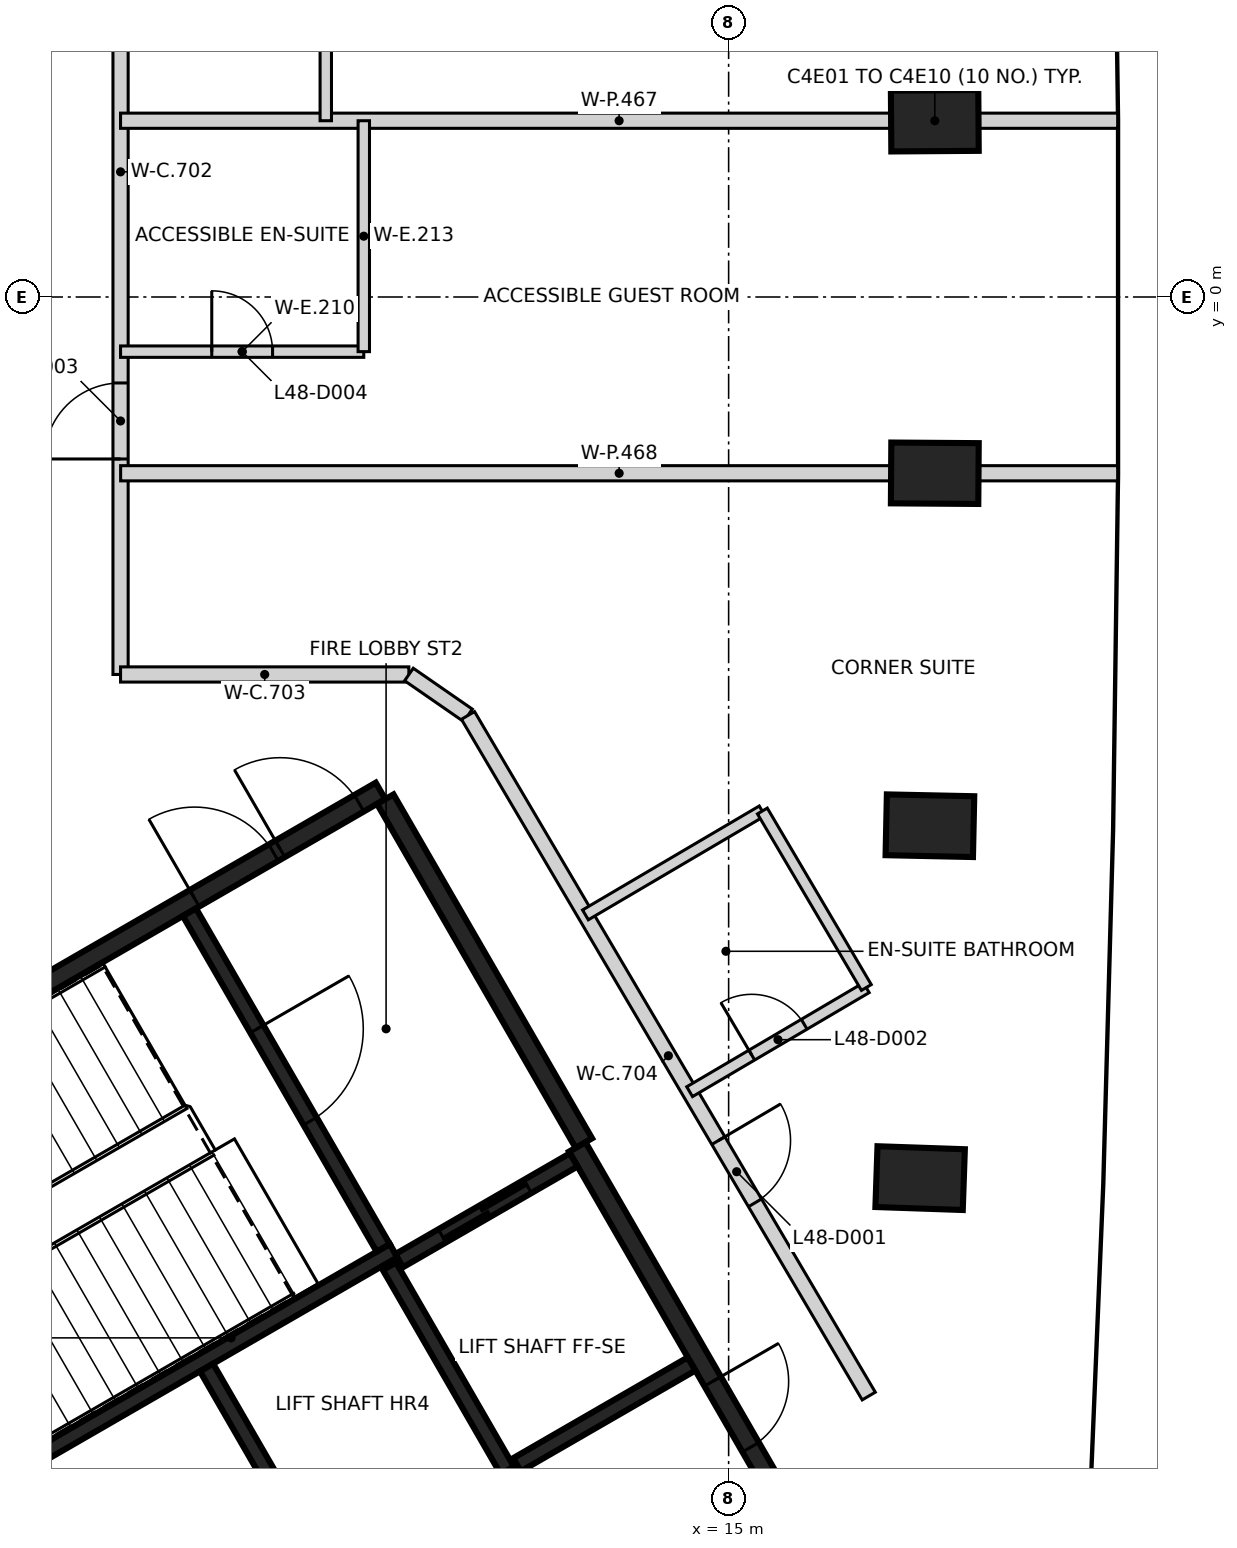
"""IFC4 building model, lengths in metres.
Left out: names, types, materials, properties, quantities, classifications, styles, units other than length and angle.
Written with IfcOpenShell. Run it as: python <this file> out.ifc"""

import sys

from ifc_helpers import new_model, si_unit, direction, frame, frame_2d, origin, origin_2d, place, context, subcontext, project, spatial, rectangle, extrude, element, fill, save


model = new_model("IFC4")
c1 = context("Model", 3, precision=1e-05, world=origin(), true_north=direction((0.0, 1.0)))
c2 = subcontext(c1, "Body", "Model", "MODEL_VIEW")
j1 = project(units=[si_unit("LENGTHUNIT", "METRE"), si_unit("PLANEANGLEUNIT", "RADIAN")], contexts=[c1])
p1 = place(None, origin())
s1 = spatial("IfcSite", under=j1, at=p1, CompositionType="ELEMENT")
p2 = place(p1, origin())
s2 = spatial("IfcBuilding", under=s1, at=p2, CompositionType="ELEMENT")
p3 = place(p2, frame((0.0, 0.0, 193.6)))
s3 = spatial("IfcBuildingStorey", under=s2, at=p3, CompositionType="ELEMENT", Elevation=193.6)
for number, where, z_axis, x_axis in (
    (1, (17.519, -11.592, -0.35), (0.0, 0.0, 1.0), (-0.999, 0.034, 0.0)),
    (2, (17.648, -6.956, -0.35), (0.0, 0.0, 1.0), (-1.0, 0.021, 0.0)),
    (3, (17.712, -2.319, -0.35), (0.0, 0.0, 1.0), (-1.0, 0.007, 0.0)),
    (4, (17.712, 2.319, -0.35), (0.0, 0.0, 1.0), (1.0, 0.007, 0.0)),
):
    element("IfcColumn", number, at=place(p3, frame(where, z_axis=z_axis, x_axis=x_axis)), inside=s3, PredefinedType="COLUMN", context=c2, shape_type="SweptSolid", body=[
        extrude(rectangle(XDim=1.15, YDim=0.8, at=origin_2d()), origin(), (0.0, 0.0, 1.0), 3.6),
    ])
p4 = place(p3, frame((0.417, -12.273, 0.0), z_axis=(0.0, 0.0, 1.0), x_axis=(0.866021906294, 0.500006057782, 0.0)))
e5 = element("IfcWall", 5, at=p4, inside=s3, PredefinedType="SHEAR", context=c2, shape_type="SweptSolid", body=[
    extrude(rectangle(XDim=11.55, YDim=0.25, at=frame_2d((5.775, 0.0))), origin(), (0.0, 0.0, 1.0), 3.25),
])
p5 = place(p4, frame((10.025, 0.0, 0.0)))
e6 = element("IfcOpeningElement", 6, at=p5, cuts=e5, PredefinedType="OPENING", context=c2, shape_type="SweptSolid", body=[
    extrude(rectangle(XDim=1.2, YDim=2.1, at=frame_2d((0.6, 1.05))), frame((0.0, 0.135, 0.0), z_axis=(0.0, -1.0, 0.0), x_axis=(1.0, 0.0, 0.0)), (0.0, 0.0, 1.0), 0.27),
])
p6 = place(p4, frame((8.725, 0.0, 0.0)))
e7 = element("IfcOpeningElement", 7, at=p6, cuts=e5, PredefinedType="OPENING", context=c2, shape_type="SweptSolid", body=[
    extrude(rectangle(XDim=1.2, YDim=2.1, at=frame_2d((0.6, 1.05))), frame((0.0, 0.135, 0.0), z_axis=(0.0, -1.0, 0.0), x_axis=(1.0, 0.0, 0.0)), (0.0, 0.0, 1.0), 0.27),
])
p7 = place(p3, frame((13.008, -11.181, 0.0), z_axis=(0.0, 0.0, 1.0), x_axis=(0.500001955336, -0.866024274868, 0.0)))
e8 = element("IfcWall", 8, at=p7, inside=s3, PredefinedType="SHEAR", context=c2, shape_type="SweptSolid", body=[
    extrude(rectangle(XDim=6.125, YDim=0.25, at=frame_2d((3.062, 0.0))), origin(), (0.0, 0.0, 1.0), 3.25),
])
p8 = place(p7, frame((3.563, 0.0, 0.0)))
e9 = element("IfcOpeningElement", 9, at=p8, cuts=e8, PredefinedType="OPENING", context=c2, shape_type="SweptSolid", body=[
    extrude(rectangle(XDim=1.0, YDim=2.1, at=frame_2d((0.5, 1.05))), frame((0.0, 0.135, 0.0), z_axis=(0.0, -1.0, 0.0), x_axis=(1.0, 0.0, 0.0)), (0.0, 0.0, 1.0), 0.27),
])
p9 = place(p3, frame((10.483, -6.606, 0.0), z_axis=(0.0, 0.0, 1.0), x_axis=(0.49999885962, -0.866026062182, 0.0)))
e10 = element("IfcWall", 10, at=p9, inside=s3, PredefinedType="SHEAR", context=c2, shape_type="SweptSolid", body=[
    extrude(rectangle(XDim=5.225, YDim=0.25, at=frame_2d((2.612, 0.0))), origin(), (0.0, 0.0, 1.0), 3.25),
])
p10 = place(p3, frame((5.419, -15.534, 0.0), z_axis=(0.0, 0.0, 1.0), x_axis=(0.866029065029, 0.499993658486, 0.0)))
e11 = element("IfcWall", 11, at=p10, inside=s3, PredefinedType="SHEAR", context=c2, shape_type="SweptSolid", body=[
    extrude(rectangle(XDim=5.974, YDim=0.2, at=frame_2d((2.987, 0.0))), origin(), (0.0, 0.0, 1.0), 3.25),
])
p11 = place(p3, frame((7.01, -18.542, 0.0), z_axis=(0.0, 0.0, 1.0), x_axis=(0.866030299012, 0.499991521122, 0.0)))
e12 = element("IfcWall", 12, at=p11, inside=s3, PredefinedType="SHEAR", context=c2, shape_type="SweptSolid", body=[
    extrude(rectangle(XDim=6.1, YDim=0.2, at=frame_2d((3.05, 0.0))), origin(), (0.0, 0.0, 1.0), 3.25),
])
p12 = place(p11, frame((1.0, 0.0, 0.0)))
e13 = element("IfcOpeningElement", 13, at=p12, cuts=e12, PredefinedType="OPENING", context=c2, shape_type="SweptSolid", body=[
    extrude(rectangle(XDim=1.2, YDim=2.1, at=frame_2d((0.6, 1.05))), frame((0.0, 0.11, 0.0), z_axis=(0.0, -1.0, 0.0), x_axis=(1.0, 0.0, 0.0)), (0.0, 0.0, 1.0), 0.22),
])
p13 = place(p11, frame((3.982, 0.0, 0.0)))
e14 = element("IfcOpeningElement", 14, at=p13, cuts=e12, PredefinedType="OPENING", context=c2, shape_type="SweptSolid", body=[
    extrude(rectangle(XDim=1.2, YDim=2.1, at=frame_2d((0.6, 1.05))), frame((0.0, 0.11, 0.0), z_axis=(0.0, -1.0, 0.0), x_axis=(1.0, 0.0, 0.0)), (0.0, 0.0, 1.0), 0.22),
])
p14 = place(p3, frame((7.906, -8.094, 0.0), z_axis=(0.0, 0.0, 1.0), x_axis=(0.500027839223, -0.866009330205, 0.0)))
e15 = element("IfcWall", 15, at=p14, inside=s3, PredefinedType="SHEAR", context=c2, shape_type="SweptSolid", body=[
    extrude(rectangle(XDim=5.098, YDim=0.2, at=frame_2d((2.549, 0.0))), origin(), (0.0, 0.0, 1.0), 3.25),
])
p15 = place(p14, frame((1.774, 0.0, 0.0)))
e16 = element("IfcOpeningElement", 16, at=p15, cuts=e15, PredefinedType="OPENING", context=c2, shape_type="SweptSolid", body=[
    extrude(rectangle(XDim=1.4, YDim=2.1, at=frame_2d((0.7, 1.05))), frame((0.0, 0.11, 0.0), z_axis=(0.0, -1.0, 0.0), x_axis=(1.0, 0.0, 0.0)), (0.0, 0.0, 1.0), 0.22),
])
p16 = place(p3, frame((8.132, -14.084, 0.0), z_axis=(0.0, 0.0, 1.0), x_axis=(0.499997778408, -0.866026686418, 0.0)))
e17 = element("IfcWall", 17, at=p16, inside=s3, PredefinedType="SHEAR", context=c2, shape_type="SweptSolid", body=[
    extrude(rectangle(XDim=3.198, YDim=0.2, at=frame_2d((1.599, 0.0))), origin(), (0.0, 0.0, 1.0), 3.25),
])
p17 = place(p3, frame((12.088, -15.437, 0.0), z_axis=(0.0, 0.0, 1.0), x_axis=(-0.500026960575, 0.86600983753, 0.0)))
e18 = element("IfcWall", 18, at=p17, inside=s3, PredefinedType="SHEAR", context=c2, shape_type="SweptSolid", body=[
    extrude(rectangle(XDim=3.1, YDim=0.2, at=frame_2d((1.55, 0.0))), origin(), (0.0, 0.0, 1.0), 3.25),
])
p18 = place(p3, frame((10.666, -12.678, 0.0), z_axis=(0.0, 0.0, 1.0), x_axis=(0.866018407898, 0.500012117035, 0.0)))
e19 = element("IfcWall", 19, at=p18, inside=s3, PredefinedType="SHEAR", context=c2, shape_type="SweptSolid", body=[
    extrude(rectangle(XDim=2.651, YDim=0.2, at=frame_2d((1.325, 0.0))), origin(), (0.0, 0.0, 1.0), 3.25),
])
p19 = place(p18, frame((0.652, 0.0, 0.0)))
e20 = element("IfcOpeningElement", 20, at=p19, cuts=e19, PredefinedType="OPENING", context=c2, shape_type="SweptSolid", body=[
    extrude(rectangle(XDim=1.3, YDim=2.1, at=frame_2d((0.65, 1.05))), frame((0.0, 0.11, 0.0), z_axis=(0.0, -1.0, 0.0), x_axis=(1.0, 0.0, 0.0)), (0.0, 0.0, 1.0), 0.22),
])
p20 = place(p3, frame((14.512, -14.037, 0.0), z_axis=(0.0, 0.0, 1.0), x_axis=(-0.866018407898, -0.500012117035, 0.0)))
e21 = element("IfcWall", 21, at=p20, inside=s3, PredefinedType="SHEAR", context=c2, shape_type="SweptSolid", body=[
    extrude(rectangle(XDim=2.651, YDim=0.2, at=frame_2d((1.325, 0.0))), origin(), (0.0, 0.0, 1.0), 3.25),
])
p21 = place(p3, frame((7.0, -4.966, 0.0), z_axis=(0.0, 0.0, 1.0), x_axis=(0.0, 1.0, 0.0)))
e22 = element("IfcWall", 22, at=p21, inside=s3, PredefinedType="PARTITIONING", context=c2, shape_type="SweptSolid", body=[
    extrude(rectangle(XDim=13.225, YDim=0.2, at=frame_2d((6.612, 0.0))), origin(), (0.0, 0.0, 1.0), 3.25),
])
p22 = place(p21, frame((2.835, 0.0, 0.0)))
e23 = element("IfcOpeningElement", 23, at=p22, cuts=e22, PredefinedType="OPENING", context=c2, shape_type="SweptSolid", body=[
    extrude(rectangle(XDim=1.0, YDim=2.1, at=frame_2d((0.5, 1.05))), frame((0.0, 0.11, 0.0), z_axis=(0.0, -1.0, 0.0), x_axis=(1.0, 0.0, 0.0)), (0.0, 0.0, 1.0), 0.22),
])
p23 = place(p21, frame((12.045, 0.0, 0.0)))
e24 = element("IfcOpeningElement", 24, at=p23, cuts=e22, PredefinedType="OPENING", context=c2, shape_type="SweptSolid", body=[
    extrude(rectangle(XDim=0.95, YDim=2.1, at=frame_2d((0.475, 1.05))), frame((0.0, 0.11, 0.0), z_axis=(0.0, -1.0, 0.0), x_axis=(1.0, 0.0, 0.0)), (0.0, 0.0, 1.0), 0.22),
])
p24 = place(p3, frame((7.0, -4.966, 0.0), z_axis=(0.0, 0.0, 1.0), x_axis=(1.0, 0.0, 0.0)))
e25 = element("IfcWall", 25, at=p24, inside=s3, PredefinedType="PARTITIONING", context=c2, shape_type="SweptSolid", body=[
    extrude(rectangle(XDim=3.793, YDim=0.2, at=frame_2d((1.896, 0.0))), origin(), (0.0, 0.0, 1.0), 3.25),
])
p25 = place(p3, frame((10.794, -4.966, 0.0), z_axis=(0.0, 0.0, 1.0), x_axis=(0.822266583859, -0.569102508401, 0.0)))
e26 = element("IfcWall", 26, at=p25, inside=s3, PredefinedType="PARTITIONING", context=c2, shape_type="SweptSolid", body=[
    extrude(rectangle(XDim=0.945, YDim=0.2, at=frame_2d((0.473, 0.0))), origin(), (0.0, 0.0, 1.0), 3.25),
])
p26 = place(p3, frame((11.571, -5.505, 0.0), z_axis=(0.0, 0.0, 1.0), x_axis=(0.507402039651, -0.861709446483, 0.0)))
e27 = element("IfcWall", 27, at=p26, inside=s3, PredefinedType="PARTITIONING", context=c2, shape_type="SweptSolid", body=[
    extrude(rectangle(XDim=10.391, YDim=0.2, at=frame_2d((5.196, 0.0))), origin(), (0.0, 0.0, 1.0), 3.25),
])
p27 = place(p26, frame((6.491, 0.0, 0.0)))
e28 = element("IfcOpeningElement", 28, at=p27, cuts=e27, PredefinedType="OPENING", context=c2, shape_type="SweptSolid", body=[
    extrude(rectangle(XDim=0.95, YDim=2.1, at=frame_2d((0.475, 1.05))), frame((0.0, 0.11, 0.0), z_axis=(0.0, -1.0, 0.0), x_axis=(1.0, 0.0, 0.0)), (0.0, 0.0, 1.0), 0.22),
])
p28 = place(p3, frame((7.0, 2.319, 0.0), z_axis=(0.0, 0.0, 1.0), x_axis=(1.0, 0.0, 0.0)))
e29 = element("IfcWall", 29, at=p28, inside=s3, PredefinedType="PARTITIONING", context=c2, shape_type="SweptSolid", body=[
    extrude(rectangle(XDim=13.118, YDim=0.2, at=frame_2d((6.559, 0.0))), origin(), (0.0, 0.0, 1.0), 3.25),
])
p29 = place(p3, frame((7.001, -2.319, 0.0), z_axis=(0.0, 0.0, 1.0), x_axis=(1.0, 0.0, 0.0)))
e30 = element("IfcWall", 30, at=p29, inside=s3, PredefinedType="PARTITIONING", context=c2, shape_type="SweptSolid", body=[
    extrude(rectangle(XDim=13.117, YDim=0.2, at=frame_2d((6.559, 0.0))), origin(), (0.0, 0.0, 1.0), 3.25),
])
p30 = place(p3, frame((7.0, -0.719, 0.0), z_axis=(0.0, 0.0, 1.0), x_axis=(1.0, 0.0, 0.0)))
e31 = element("IfcWall", 31, at=p30, inside=s3, PredefinedType="PARTITIONING", context=c2, shape_type="SweptSolid", body=[
    extrude(rectangle(XDim=3.2, YDim=0.15, at=frame_2d((1.6, 0.0))), origin(), (0.0, 0.0, 1.0), 3.25),
])
p31 = place(p30, frame((1.2, 0.0, 0.0)))
e32 = element("IfcOpeningElement", 32, at=p31, cuts=e31, PredefinedType="OPENING", context=c2, shape_type="SweptSolid", body=[
    extrude(rectangle(XDim=0.8, YDim=2.1, at=frame_2d((0.4, 1.05))), frame((0.0, 0.085, 0.0), z_axis=(0.0, -1.0, 0.0), x_axis=(1.0, 0.0, 0.0)), (0.0, 0.0, 1.0), 0.17),
])
p32 = place(p3, frame((9.7, 2.319, 0.0), z_axis=(0.0, 0.0, 1.0), x_axis=(0.0, 1.0, 0.0)))
e33 = element("IfcWall", 33, at=p32, inside=s3, PredefinedType="PARTITIONING", context=c2, shape_type="SweptSolid", body=[
    extrude(rectangle(XDim=2.7, YDim=0.15, at=frame_2d((1.35, 0.0))), origin(), (0.0, 0.0, 1.0), 3.25),
])
p33 = place(p3, frame((10.2, -0.719, 0.0), z_axis=(0.0, 0.0, 1.0), x_axis=(0.0, 1.0, 0.0)))
e34 = element("IfcWall", 34, at=p33, inside=s3, PredefinedType="PARTITIONING", context=c2, shape_type="SweptSolid", body=[
    extrude(rectangle(XDim=3.038, YDim=0.15, at=frame_2d((1.519, 0.0))), origin(), (0.0, 0.0, 1.0), 3.25),
])
p34 = place(p3, frame((13.116, -8.129, 0.0), z_axis=(0.0, 0.0, 1.0), x_axis=(0.861885352062, 0.507103184669, 0.0)))
e35 = element("IfcWall", 35, at=p34, inside=s3, PredefinedType="PARTITIONING", context=c2, shape_type="SweptSolid", body=[
    extrude(rectangle(XDim=2.698, YDim=0.15, at=frame_2d((1.349, 0.0))), origin(), (0.0, 0.0, 1.0), 3.25),
])
p35 = place(p3, frame((14.487, -10.455, 0.0), z_axis=(0.0, 0.0, 1.0), x_axis=(0.861752634979, 0.507328686461, 0.0)))
e36 = element("IfcWall", 36, at=p35, inside=s3, PredefinedType="PARTITIONING", context=c2, shape_type="SweptSolid", body=[
    extrude(rectangle(XDim=2.697, YDim=0.15, at=frame_2d((1.348, 0.0))), origin(), (0.0, 0.0, 1.0), 3.25),
])
p36 = place(p35, frame((0.948, 0.0, 0.0)))
e37 = element("IfcOpeningElement", 37, at=p36, cuts=e36, PredefinedType="OPENING", context=c2, shape_type="SweptSolid", body=[
    extrude(rectangle(XDim=0.8, YDim=2.1, at=frame_2d((0.4, 1.05))), frame((0.0, 0.085, 0.0), z_axis=(0.0, -1.0, 0.0), x_axis=(1.0, 0.0, 0.0)), (0.0, 0.0, 1.0), 0.17),
])
p37 = place(p3, frame((15.444, -6.762, 0.0), z_axis=(0.0, 0.0, 1.0), x_axis=(0.507578234334, -0.861605673165, 0.0)))
e38 = element("IfcWall", 38, at=p37, inside=s3, PredefinedType="PARTITIONING", context=c2, shape_type="SweptSolid", body=[
    extrude(rectangle(XDim=2.695, YDim=0.15, at=frame_2d((1.348, 0.0))), origin(), (0.0, 0.0, 1.0), 3.25),
])
p38 = place(p19, origin())
e39 = element("IfcDoor", 39, at=p38, inside=s3, OperationType="SLIDING_TO_RIGHT", PredefinedType="DOOR", context=c2, shape_type="SweptSolid", body=[
    extrude(rectangle(XDim=1.3, YDim=2.1, at=frame_2d((0.65, 1.05))), frame((0.0, 0.025, 0.0), z_axis=(0.0, -1.0, 0.0), x_axis=(1.0, 0.0, 0.0)), (0.0, 0.0, 1.0), 0.05),
])
fill(e20, e39)
p39 = place(p8, origin())
e40 = element("IfcDoor", 40, at=p39, inside=s3, OperationType="SINGLE_SWING_LEFT", PredefinedType="DOOR", context=c2, shape_type="SweptSolid", body=[
    extrude(rectangle(XDim=1.0, YDim=2.1, at=frame_2d((0.5, 1.05))), frame((0.0, 0.025, 0.0), z_axis=(0.0, -1.0, 0.0), x_axis=(1.0, 0.0, 0.0)), (0.0, 0.0, 1.0), 0.05),
])
fill(e9, e40)
p40 = place(p5, origin())
e41 = element("IfcDoor", 41, at=p40, inside=s3, OperationType="SINGLE_SWING_LEFT", PredefinedType="DOOR", context=c2, shape_type="SweptSolid", body=[
    extrude(rectangle(XDim=1.2, YDim=2.1, at=frame_2d((0.6, 1.05))), frame((0.0, 0.025, 0.0), z_axis=(0.0, -1.0, 0.0), x_axis=(1.0, 0.0, 0.0)), (0.0, 0.0, 1.0), 0.05),
])
fill(e6, e41)
p41 = place(p6, origin())
e42 = element("IfcDoor", 42, at=p41, inside=s3, OperationType="SINGLE_SWING_RIGHT", PredefinedType="DOOR", context=c2, shape_type="SweptSolid", body=[
    extrude(rectangle(XDim=1.2, YDim=2.1, at=frame_2d((0.6, 1.05))), frame((0.0, 0.025, 0.0), z_axis=(0.0, -1.0, 0.0), x_axis=(1.0, 0.0, 0.0)), (0.0, 0.0, 1.0), 0.05),
])
fill(e7, e42)
p42 = place(p15, origin())
e43 = element("IfcDoor", 43, at=p42, inside=s3, OperationType="SINGLE_SWING_RIGHT", PredefinedType="DOOR", context=c2, shape_type="SweptSolid", body=[
    extrude(rectangle(XDim=1.4, YDim=2.1, at=frame_2d((0.7, 1.05))), frame((0.0, 0.025, 0.0), z_axis=(0.0, -1.0, 0.0), x_axis=(1.0, 0.0, 0.0)), (0.0, 0.0, 1.0), 0.05),
])
fill(e16, e43)
p43 = place(p27, origin())
e44 = element("IfcDoor", 44, at=p43, inside=s3, OperationType="SINGLE_SWING_LEFT", PredefinedType="DOOR", context=c2, shape_type="SweptSolid", body=[
    extrude(rectangle(XDim=0.95, YDim=2.1, at=frame_2d((0.475, 1.05))), frame((0.0, 0.025, 0.0), z_axis=(0.0, -1.0, 0.0), x_axis=(1.0, 0.0, 0.0)), (0.0, 0.0, 1.0), 0.05),
])
fill(e28, e44)
p44 = place(p36, frame((0.8, 0.0, 0.0), z_axis=(0.0, 0.0, 1.0), x_axis=(-1.0, 0.0, 0.0)))
e45 = element("IfcDoor", 45, at=p44, inside=s3, OperationType="SINGLE_SWING_LEFT", PredefinedType="DOOR", context=c2, shape_type="SweptSolid", body=[
    extrude(rectangle(XDim=0.8, YDim=2.1, at=frame_2d((0.4, 1.05))), frame((0.0, 0.025, 0.0), z_axis=(0.0, -1.0, 0.0), x_axis=(1.0, 0.0, 0.0)), (0.0, 0.0, 1.0), 0.05),
])
fill(e37, e45)
p45 = place(p22, frame((1.0, 0.0, 0.0), z_axis=(0.0, 0.0, 1.0), x_axis=(-1.0, 0.0, 0.0)))
e46 = element("IfcDoor", 46, at=p45, inside=s3, OperationType="SINGLE_SWING_LEFT", PredefinedType="DOOR", context=c2, shape_type="SweptSolid", body=[
    extrude(rectangle(XDim=1.0, YDim=2.1, at=frame_2d((0.5, 1.05))), frame((0.0, 0.025, 0.0), z_axis=(0.0, -1.0, 0.0), x_axis=(1.0, 0.0, 0.0)), (0.0, 0.0, 1.0), 0.05),
])
fill(e23, e46)
p46 = place(p31, origin())
e47 = element("IfcDoor", 47, at=p46, inside=s3, OperationType="SINGLE_SWING_LEFT", PredefinedType="DOOR", context=c2, shape_type="SweptSolid", body=[
    extrude(rectangle(XDim=0.8, YDim=2.1, at=frame_2d((0.4, 1.05))), frame((0.0, 0.025, 0.0), z_axis=(0.0, -1.0, 0.0), x_axis=(1.0, 0.0, 0.0)), (0.0, 0.0, 1.0), 0.05),
])
fill(e32, e47)
save(model, sys.argv[1])
